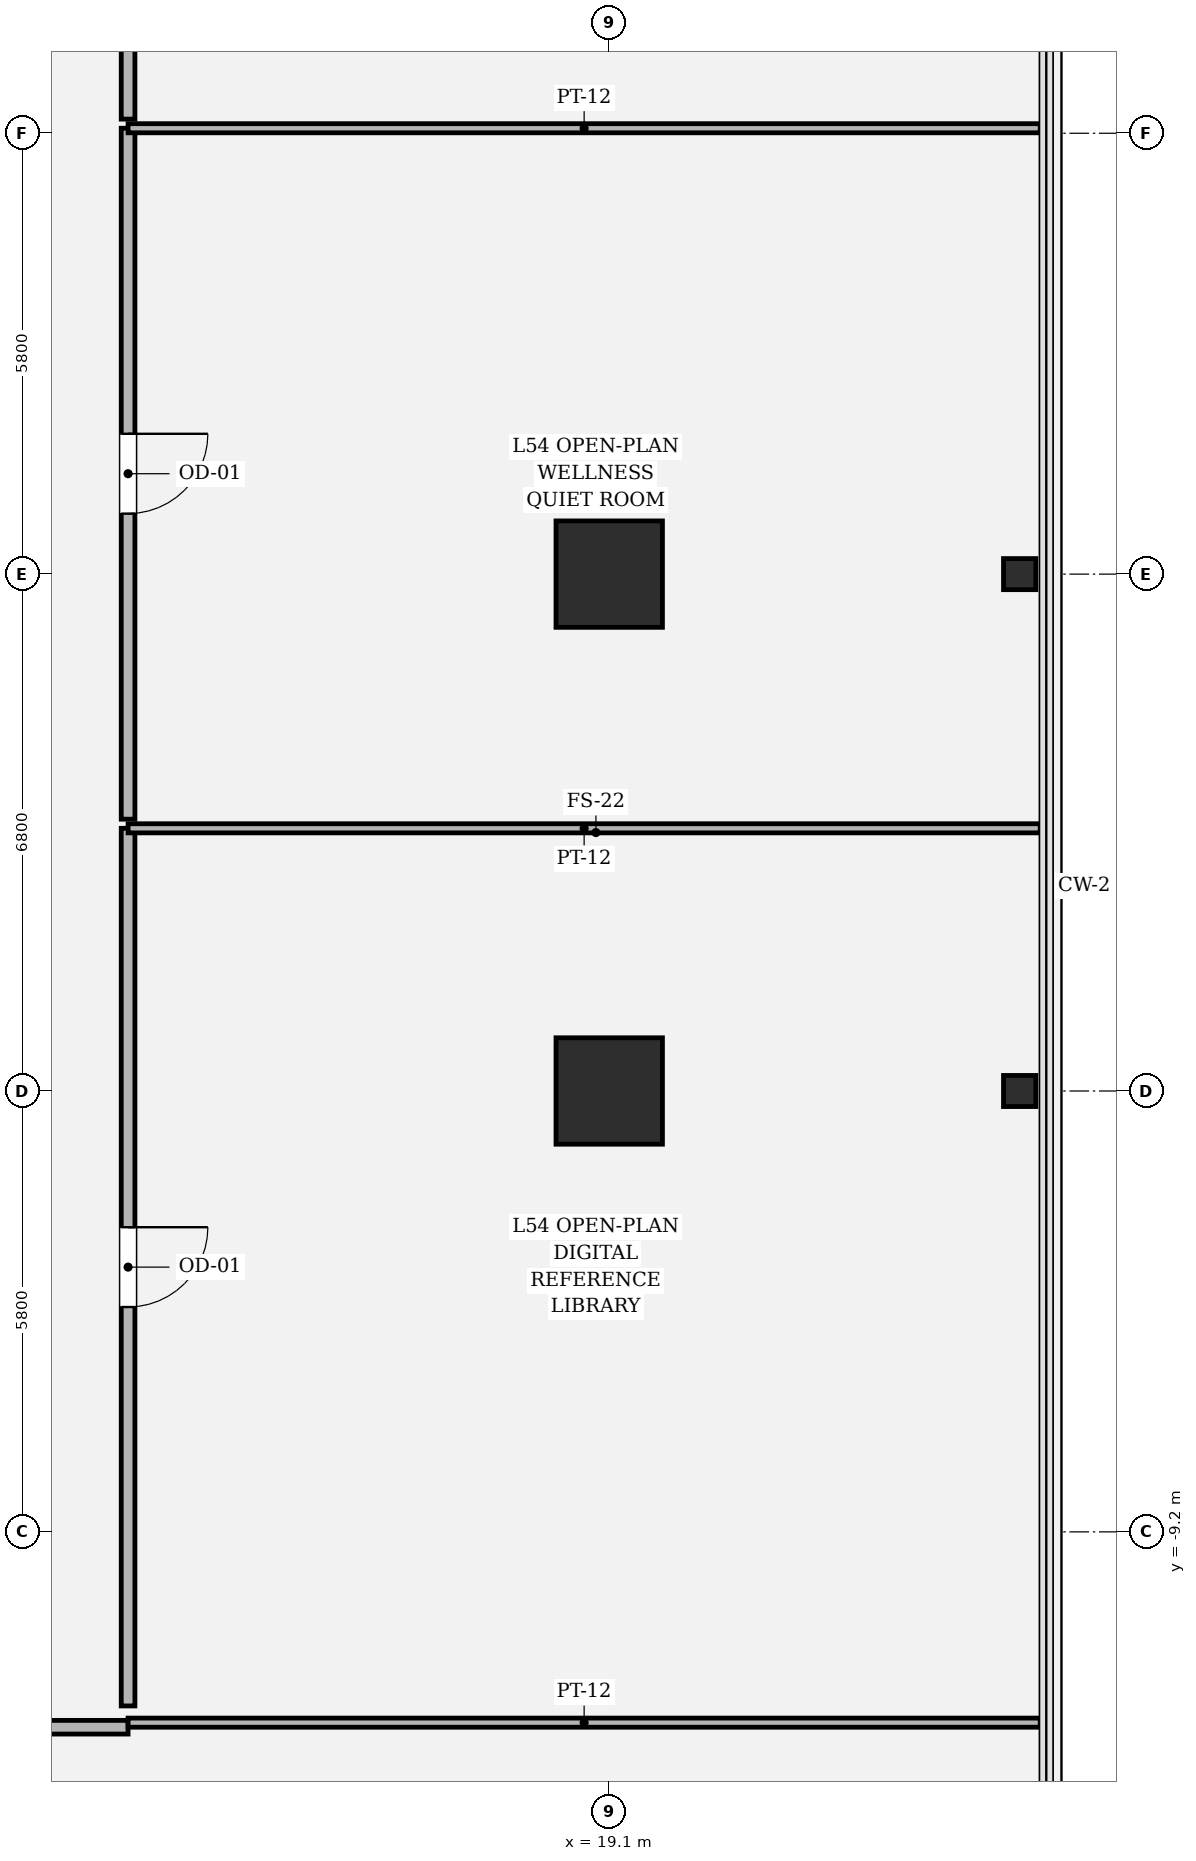
"""IFC4 building model, lengths in metres.
Left out: names, types, materials, properties, quantities, classifications, styles, units other than length and angle.
Written with IfcOpenShell. Run it as: python <this file> out.ifc"""

import sys

from ifc_helpers import new_model, si_unit, direction, frame, frame_2d, origin, origin_2d, place, context, subcontext, project, spatial, rectangle, hollow_rectangle, i_section, extrude, element, fill, save


model = new_model("IFC4")
c1 = context("Model", 3, precision=1e-05, world=origin(), true_north=direction((0.0, 1.0)))
c2 = subcontext(c1, "Body", "Model", "MODEL_VIEW")
j1 = project(units=[si_unit("LENGTHUNIT", "METRE"), si_unit("PLANEANGLEUNIT", "RADIAN")], contexts=[c1])
p1 = place(None, origin())
s1 = spatial("IfcSite", under=j1, at=p1, CompositionType="ELEMENT")
p2 = place(p1, origin())
s2 = spatial("IfcBuilding", under=s1, at=p2, CompositionType="ELEMENT")
p3 = place(p2, frame((0.0, 0.0, 228.9)))
s3 = spatial("IfcBuildingStorey", under=s2, at=p3, CompositionType="ELEMENT", Elevation=228.9)
for number, where, z_axis, x_axis in (
    (1, (19.1, -3.4, 0.0), (0.0, 0.0, 1.0), (1.0, 0.0, 0.0)),
    (2, (19.1, 3.4, 0.0), (0.0, 0.0, 1.0), (1.0, 0.0, 0.0)),
):
    element("IfcColumn", number, at=place(p3, frame(where, z_axis=z_axis, x_axis=x_axis)), inside=s3, PredefinedType="COLUMN", context=c2, shape_type="SweptSolid", body=[
        extrude(hollow_rectangle(XDim=1.4, YDim=1.4, WallThickness=0.042, at=origin_2d()), origin(), (0.0, 0.0, 1.0), 4.05),
    ])
for number, where, z_axis, x_axis in (
    (3, (24.5, -3.4, 0.0), (0.0, 0.0, 1.0), (0.0, 1.0, 0.0)),
    (4, (24.5, 3.4, 0.0), (0.0, 0.0, 1.0), (0.0, 1.0, 0.0)),
):
    element("IfcColumn", number, at=place(p3, frame(where, z_axis=z_axis, x_axis=x_axis)), inside=s3, PredefinedType="COLUMN", context=c2, shape_type="SweptSolid", body=[
        extrude(i_section(OverallWidth=0.409, OverallDepth=0.425, WebThickness=0.032, FlangeThickness=0.052, FilletRadius=0.018, at=origin_2d()), origin(), (0.0, 0.0, 1.0), 4.048),
    ])
p4 = place(p3, frame((5.238, -11.77, 0.0), z_axis=(0.0, 0.0, 1.0), x_axis=(1.0, 0.0, 0.0)))
e5 = element("IfcWall", 5, at=p4, inside=s3, PredefinedType="PARTITIONING", context=c2, shape_type="SweptSolid", body=[
    extrude(rectangle(XDim=7.532, YDim=0.18, at=frame_2d((3.766, 0.0))), origin(), (0.0, 0.0, 1.0), 3.174),
])
p5 = place(p4, frame((3.066, 0.0, 0.0)))
e6 = element("IfcOpeningElement", 6, at=p5, cuts=e5, PredefinedType="OPENING", context=c2, shape_type="SweptSolid", body=[
    extrude(rectangle(XDim=1.4, YDim=2.25, at=frame_2d((0.7, 1.125))), frame((0.0, 0.1, 0.0), z_axis=(0.0, -1.0, 0.0), x_axis=(1.0, 0.0, 0.0)), (0.0, 0.0, 1.0), 0.2),
])
p6 = place(p3, frame((12.77, -11.71, 0.0), z_axis=(0.0, 0.0, 1.0), x_axis=(1.0, 0.0, 0.0)))
e7 = element("IfcWall", 7, at=p6, inside=s3, PredefinedType="PARTITIONING", context=c2, shape_type="SweptSolid", body=[
    extrude(rectangle(XDim=12.0, YDim=0.12, at=frame_2d((6.0, 0.0))), origin(), (0.0, 0.0, 1.0), 3.174),
])
p7 = place(p3, frame((12.77, -11.49, 0.0), z_axis=(0.0, 0.0, 1.0), x_axis=(0.0, 1.0, 0.0)))
e8 = element("IfcWall", 8, at=p7, inside=s3, PredefinedType="PARTITIONING", context=c2, shape_type="SweptSolid", body=[
    extrude(rectangle(XDim=11.546, YDim=0.18, at=frame_2d((5.773, 0.0))), origin(), (0.0, 0.0, 1.0), 3.174),
])
p8 = place(p7, frame((5.248, 0.0, 0.0)))
e9 = element("IfcOpeningElement", 9, at=p8, cuts=e8, PredefinedType="OPENING", context=c2, shape_type="SweptSolid", body=[
    extrude(rectangle(XDim=1.05, YDim=2.2, at=frame_2d((0.525, 1.1))), frame((0.0, 0.1, 0.0), z_axis=(0.0, -1.0, 0.0), x_axis=(1.0, 0.0, 0.0)), (0.0, 0.0, 1.0), 0.2),
])
p9 = place(p3, frame((12.77, 0.056, 0.0), z_axis=(0.0, 0.0, 1.0), x_axis=(1.0, 0.0, 0.0)))
e10 = element("IfcWall", 10, at=p9, inside=s3, PredefinedType="PARTITIONING", context=c2, shape_type="SweptSolid", body=[
    extrude(rectangle(XDim=12.0, YDim=0.12, at=frame_2d((6.0, 0.0))), origin(), (0.0, 0.0, 1.0), 2.544),
])
p10 = place(p3, frame((12.77, 0.176, 0.0), z_axis=(0.0, 0.0, 1.0), x_axis=(0.0, 1.0, 0.0)))
e11 = element("IfcWall", 11, at=p10, inside=s3, PredefinedType="PARTITIONING", context=c2, shape_type="SweptSolid", body=[
    extrude(rectangle(XDim=9.09, YDim=0.18, at=frame_2d((4.545, 0.0))), origin(), (0.0, 0.0, 1.0), 3.174),
])
p11 = place(p10, frame((4.02, 0.0, 0.0)))
e12 = element("IfcOpeningElement", 12, at=p11, cuts=e11, PredefinedType="OPENING", context=c2, shape_type="SweptSolid", body=[
    extrude(rectangle(XDim=1.05, YDim=2.2, at=frame_2d((0.525, 1.1))), frame((0.0, 0.1, 0.0), z_axis=(0.0, -1.0, 0.0), x_axis=(1.0, 0.0, 0.0)), (0.0, 0.0, 1.0), 0.2),
])
p12 = place(p3, frame((12.77, 9.266, 0.0), z_axis=(0.0, 0.0, 1.0), x_axis=(1.0, 0.0, 0.0)))
e13 = element("IfcWall", 13, at=p12, inside=s3, PredefinedType="PARTITIONING", context=c2, shape_type="SweptSolid", body=[
    extrude(rectangle(XDim=12.0, YDim=0.12, at=frame_2d((6.0, 0.0))), origin(), (0.0, 0.0, 1.0), 2.544),
])
p13 = place(p3, frame((12.77, 9.386, 0.0), z_axis=(0.0, 0.0, 1.0), x_axis=(0.0, 1.0, 0.0)))
e14 = element("IfcWall", 14, at=p13, inside=s3, PredefinedType="PARTITIONING", context=c2, shape_type="SweptSolid", body=[
    extrude(rectangle(XDim=8.984, YDim=0.18, at=frame_2d((4.492, 0.0))), origin(), (0.0, 0.0, 1.0), 3.174),
])
p14 = place(p13, frame((3.967, 0.0, 0.0)))
e15 = element("IfcOpeningElement", 15, at=p14, cuts=e14, PredefinedType="OPENING", context=c2, shape_type="SweptSolid", body=[
    extrude(rectangle(XDim=1.05, YDim=2.2, at=frame_2d((0.525, 1.1))), frame((0.0, 0.1, 0.0), z_axis=(0.0, -1.0, 0.0), x_axis=(1.0, 0.0, 0.0)), (0.0, 0.0, 1.0), 0.2),
])
p15 = place(p8, origin())
e16 = element("IfcDoor", 16, at=p15, inside=s3, OperationType="SINGLE_SWING_RIGHT", PredefinedType="DOOR", context=c2, shape_type="SweptSolid", body=[
    extrude(rectangle(XDim=1.05, YDim=2.2, at=frame_2d((0.525, 1.1))), frame((0.0, 0.025, 0.0), z_axis=(0.0, -1.0, 0.0), x_axis=(1.0, 0.0, 0.0)), (0.0, 0.0, 1.0), 0.05),
])
fill(e9, e16)
p16 = place(p11, origin())
e17 = element("IfcDoor", 17, at=p16, inside=s3, OperationType="SINGLE_SWING_RIGHT", PredefinedType="DOOR", context=c2, shape_type="SweptSolid", body=[
    extrude(rectangle(XDim=1.05, YDim=2.2, at=frame_2d((0.525, 1.1))), frame((0.0, 0.025, 0.0), z_axis=(0.0, -1.0, 0.0), x_axis=(1.0, 0.0, 0.0)), (0.0, 0.0, 1.0), 0.05),
])
fill(e12, e17)
save(model, sys.argv[1])
